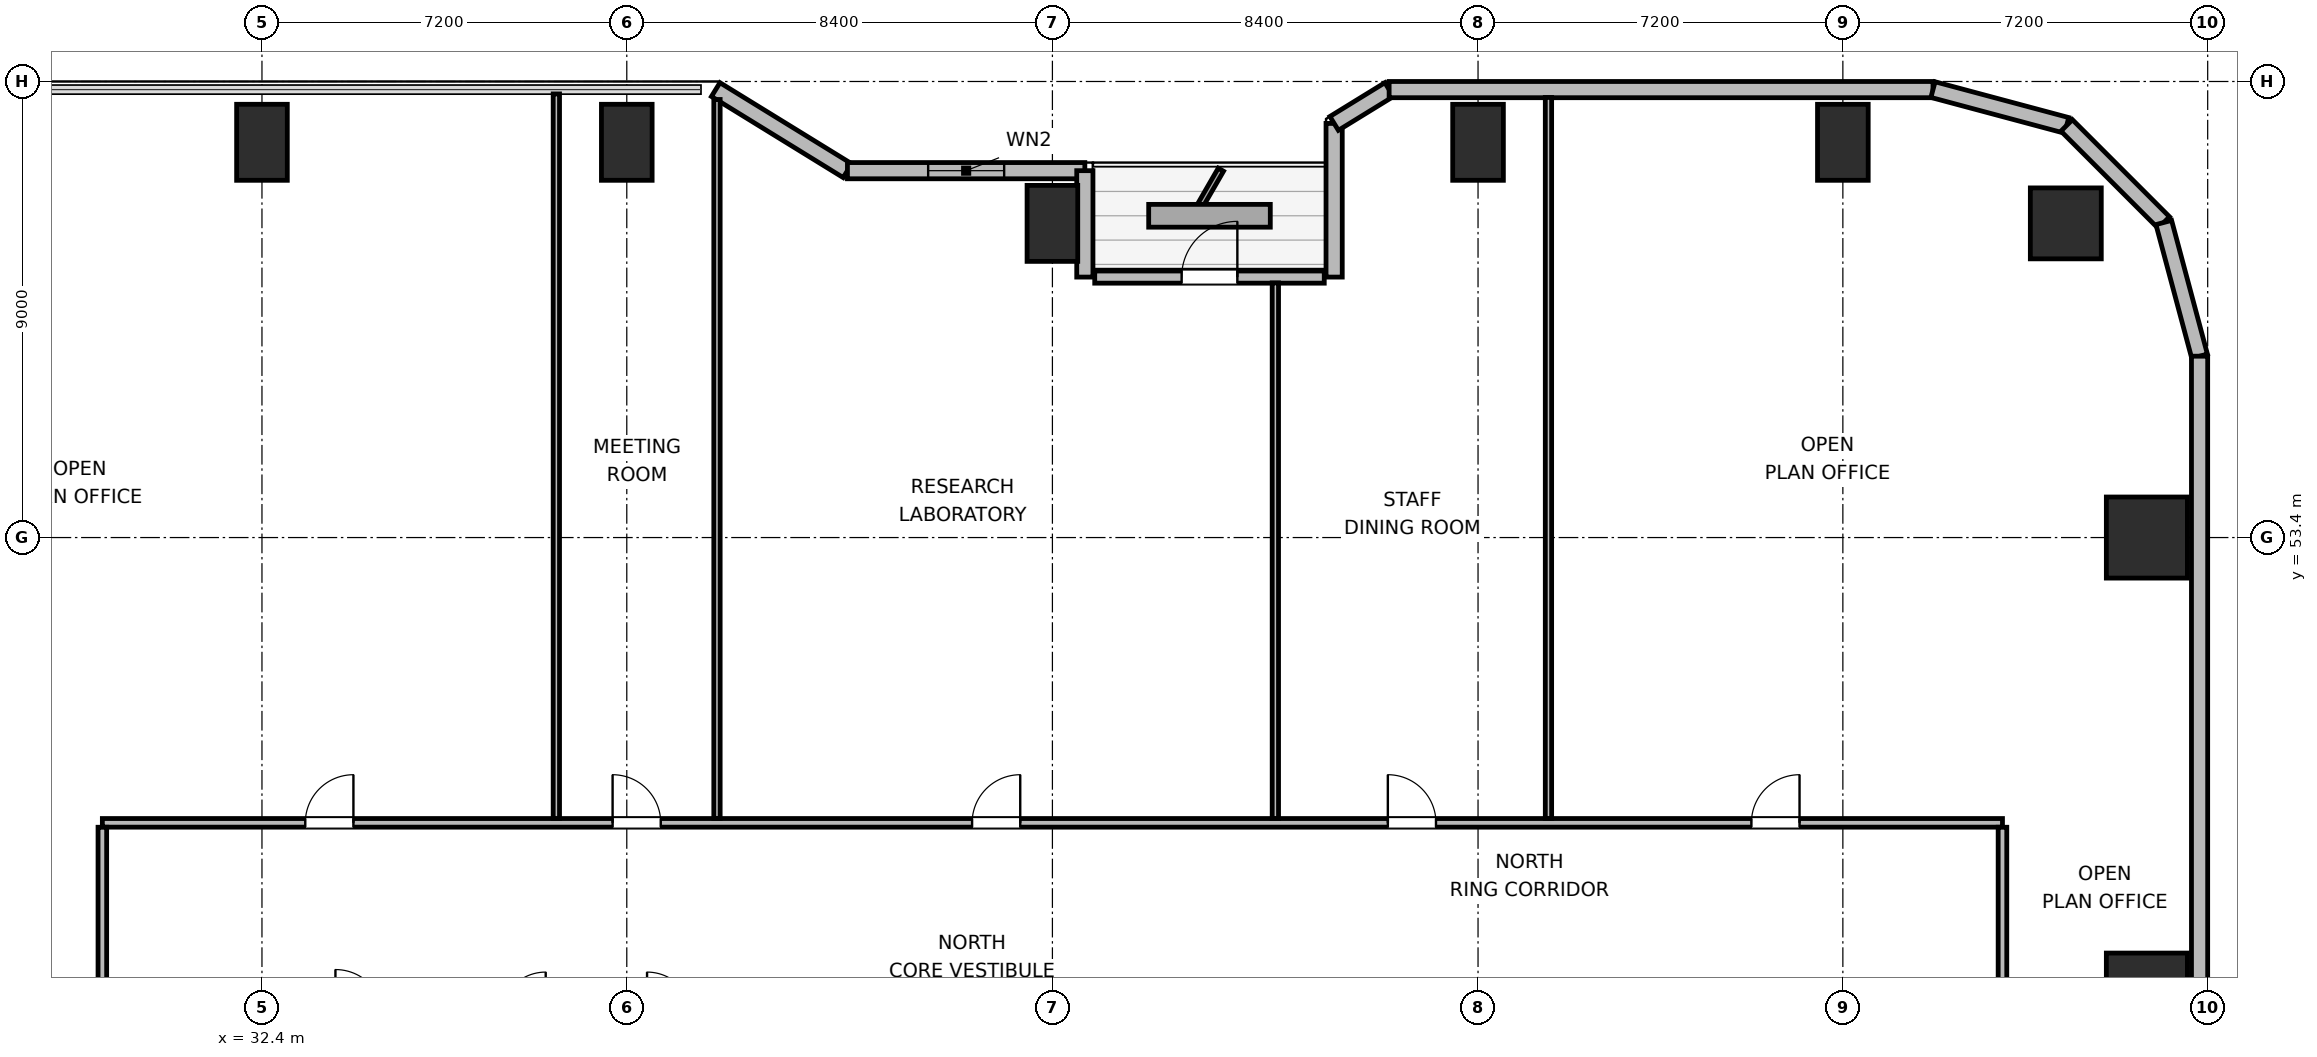
"""IFC4 building model, lengths in metres.
Left out: names, types, materials, properties, quantities, classifications, styles, units other than length and angle.
Written with IfcOpenShell. Run it as: python <this file> out.ifc"""

import sys

from ifc_helpers import new_model, si_unit, direction, frame, frame_2d, origin, origin_2d, place, context, subcontext, project, spatial, rectangle, circle, extrude, element, fill, save


model = new_model("IFC4")
c1 = context("Model", 3, precision=1e-05, world=origin(), true_north=direction((0.0, 1.0)))
c2 = subcontext(c1, "Body", "Model", "MODEL_VIEW")
j1 = project(units=[si_unit("LENGTHUNIT", "METRE"), si_unit("PLANEANGLEUNIT", "RADIAN")], contexts=[c1])
p1 = place(None, origin())
s1 = spatial("IfcSite", under=j1, at=p1, CompositionType="ELEMENT")
p2 = place(p1, origin())
s2 = spatial("IfcBuilding", under=s1, at=p2, CompositionType="ELEMENT")
p3 = place(p2, frame((0.0, 0.0, 89.7)))
s3 = spatial("IfcBuildingStorey", under=s2, at=p3, CompositionType="ELEMENT", Elevation=89.7)
p4 = place(p3, frame((68.0, 59.6, 0.0), z_axis=(0.0, 0.0, 1.0), x_axis=(1.0, 0.0, 0.0)))
e1 = element("IfcColumn", 1, at=p4, inside=s3, PredefinedType="COLUMN", context=c2, shape_type="SweptSolid", body=[
    extrude(circle(Radius=0.7, at=origin_2d()), origin(), (0.0, 0.0, 1.0), 3.9),
])
for number, where, z_axis, x_axis in (
    (2, (32.4, 61.2, 0.0), (0.0, 0.0, 1.0), (1.0, 0.0, 0.0)),
    (3, (39.6, 61.2, 0.0), (0.0, 0.0, 1.0), (1.0, 0.0, 0.0)),
    (4, (48.0, 59.6, 0.0), (0.0, 0.0, 1.0), (1.0, 0.0, 0.0)),
    (5, (56.4, 61.2, 0.0), (0.0, 0.0, 1.0), (1.0, 0.0, 0.0)),
    (6, (63.6, 61.2, 0.0), (0.0, 0.0, 1.0), (1.0, 0.0, 0.0)),
):
    element("IfcColumn", number, at=place(p3, frame(where, z_axis=z_axis, x_axis=x_axis)), inside=s3, PredefinedType="COLUMN", context=c2, shape_type="SweptSolid", body=[
        extrude(rectangle(XDim=1.0, YDim=1.5, at=origin_2d()), origin(), (0.0, 0.0, 1.0), 3.9),
    ])
for number, where, z_axis, x_axis in (
    (7, (69.6, 44.4, 0.0), (0.0, 0.0, 1.0), (1.0, 0.0, 0.0)),
    (8, (69.6, 53.4, 0.0), (0.0, 0.0, 1.0), (1.0, 0.0, 0.0)),
):
    element("IfcColumn", number, at=place(p3, frame(where, z_axis=z_axis, x_axis=x_axis)), inside=s3, PredefinedType="COLUMN", context=c2, shape_type="SweptSolid", body=[
        extrude(rectangle(XDim=1.6, YDim=1.6, at=origin_2d()), origin(), (0.0, 0.0, 1.0), 3.9),
    ])
p5 = place(p3, frame((41.355, 62.24, 0.0), z_axis=(0.0, 0.0, 1.0), x_axis=(0.851630857047, -0.524142044989, 0.0)))
e9 = element("IfcWall", 9, at=p5, inside=s3, PredefinedType="SOLIDWALL", context=c2, shape_type="SweptSolid", body=[
    extrude(rectangle(XDim=3.053, YDim=0.32, at=frame_2d((1.526, 0.0))), origin(), (0.0, 0.0, 1.0), 2.875),
])
p6 = place(p3, frame((43.955, 60.64, 0.0), z_axis=(0.0, 0.0, 1.0), x_axis=(1.0, 0.0, 0.0)))
e10 = element("IfcWall", 10, at=p6, inside=s3, PredefinedType="SOLIDWALL", context=c2, shape_type="SweptSolid", body=[
    extrude(rectangle(XDim=4.685, YDim=0.32, at=frame_2d((2.343, 0.0))), origin(), (0.0, 0.0, 1.0), 2.875),
])
p7 = place(p6, frame((1.593, 0.0, 0.85)))
e11 = element("IfcOpeningElement", 11, at=p7, cuts=e10, PredefinedType="OPENING", context=c2, shape_type="SweptSolid", body=[
    extrude(rectangle(XDim=1.5, YDim=1.1, at=frame_2d((0.75, 0.55))), frame((0.0, 0.17, 0.0), z_axis=(0.0, -1.0, 0.0), x_axis=(1.0, 0.0, 0.0)), (0.0, 0.0, 1.0), 0.34),
])
p8 = place(p3, frame((48.64, 60.64, 0.0), z_axis=(0.0, 0.0, 1.0), x_axis=(0.0, -1.0, 0.0)))
e12 = element("IfcWall", 12, at=p8, inside=s3, PredefinedType="SOLIDWALL", context=c2, shape_type="SweptSolid", body=[
    extrude(rectangle(XDim=2.1, YDim=0.32, at=frame_2d((1.05, 0.0))), origin(), (0.0, 0.0, 1.0), 2.875),
])
p9 = place(p3, frame((48.835, 58.54, 0.0), z_axis=(0.0, 0.0, 1.0), x_axis=(1.0, 0.0, 0.0)))
e13 = element("IfcWall", 13, at=p9, inside=s3, PredefinedType="SOLIDWALL", context=c2, shape_type="SweptSolid", body=[
    extrude(rectangle(XDim=4.53, YDim=0.24, at=frame_2d((2.265, 0.0))), origin(), (0.0, 0.0, 1.0), 3.64),
])
p10 = place(p9, frame((1.715, 0.0, 0.0)))
e14 = element("IfcOpeningElement", 14, at=p10, cuts=e13, PredefinedType="OPENING", context=c2, shape_type="SweptSolid", body=[
    extrude(rectangle(XDim=1.1, YDim=2.04, at=frame_2d((0.55, 1.02))), frame((0.0, 0.13, 0.0), z_axis=(0.0, -1.0, 0.0), x_axis=(1.0, 0.0, 0.0)), (0.0, 0.0, 1.0), 0.26),
])
p11 = place(p3, frame((53.56, 58.54, 0.0), z_axis=(0.0, 0.0, 1.0), x_axis=(0.0, 1.0, 0.0)))
e15 = element("IfcWall", 15, at=p11, inside=s3, PredefinedType="SOLIDWALL", context=c2, shape_type="SweptSolid", body=[
    extrude(rectangle(XDim=3.032, YDim=0.32, at=frame_2d((1.516, 0.0))), origin(), (0.0, 0.0, 1.0), 2.875),
])
p12 = place(p3, frame((53.56, 61.573, 0.0), z_axis=(0.0, 0.0, 1.0), x_axis=(0.851776724646, 0.523904964045, 0.0)))
e16 = element("IfcWall", 16, at=p12, inside=s3, PredefinedType="SOLIDWALL", context=c2, shape_type="SweptSolid", body=[
    extrude(rectangle(XDim=1.274, YDim=0.32, at=frame_2d((0.637, 0.0))), origin(), (0.0, 0.0, 1.0), 3.64),
])
p13 = place(p3, frame((54.645, 62.24, 0.0), z_axis=(0.0, 0.0, 1.0), x_axis=(1.0, 0.0, 0.0)))
e17 = element("IfcWall", 17, at=p13, inside=s3, PredefinedType="SOLIDWALL", context=c2, shape_type="SweptSolid", body=[
    extrude(rectangle(XDim=10.734, YDim=0.32, at=frame_2d((5.367, 0.0))), origin(), (0.0, 0.0, 1.0), 3.64),
])
p14 = place(p3, frame((65.379, 62.24, 0.0), z_axis=(0.0, 0.0, 1.0), x_axis=(0.965958423373, -0.25869736047, 0.0)))
e18 = element("IfcWall", 18, at=p14, inside=s3, PredefinedType="SOLIDWALL", context=c2, shape_type="SweptSolid", body=[
    extrude(rectangle(XDim=2.731, YDim=0.32, at=frame_2d((1.366, 0.0))), origin(), (0.0, 0.0, 1.0), 3.64),
])
p15 = place(p3, frame((68.017, 61.533, 0.0), z_axis=(0.0, 0.0, 1.0), x_axis=(0.707151821269, -0.707061738235, 0.0)))
e19 = element("IfcWall", 19, at=p15, inside=s3, PredefinedType="SOLIDWALL", context=c2, shape_type="SweptSolid", body=[
    extrude(rectangle(XDim=2.71, YDim=0.32, at=frame_2d((1.355, 0.0))), origin(), (0.0, 0.0, 1.0), 3.64),
])
p16 = place(p3, frame((69.934, 59.617, 0.0), z_axis=(0.0, 0.0, 1.0), x_axis=(0.258613949072, -0.965980758269, 0.0)))
e20 = element("IfcWall", 20, at=p16, inside=s3, PredefinedType="SOLIDWALL", context=c2, shape_type="SweptSolid", body=[
    extrude(rectangle(XDim=2.731, YDim=0.32, at=frame_2d((1.366, 0.0))), origin(), (0.0, 0.0, 1.0), 3.64),
])
p17 = place(p3, frame((70.64, 56.979, 0.0), z_axis=(0.0, 0.0, 1.0), x_axis=(0.0, -1.0, 0.0)))
e21 = element("IfcWall", 21, at=p17, inside=s3, PredefinedType="SOLIDWALL", context=c2, shape_type="SweptSolid", body=[
    extrude(rectangle(XDim=14.219, YDim=0.32, at=frame_2d((7.109, 0.0))), origin(), (0.0, 0.0, 1.0), 3.64),
])
p18 = place(p3, frame((29.25, 47.77, 0.0), z_axis=(0.0, 0.0, 1.0), x_axis=(1.0, 0.0, 0.0)))
e22 = element("IfcWall", 22, at=p18, inside=s3, PredefinedType="PARTITIONING", context=c2, shape_type="SweptSolid", body=[
    extrude(rectangle(XDim=37.5, YDim=0.17, at=frame_2d((18.75, 0.0))), origin(), (0.0, 0.0, 1.0), 3.64),
])
p19 = place(p18, frame((4.005, 0.0, 0.0)))
e23 = element("IfcOpeningElement", 23, at=p19, cuts=e22, PredefinedType="OPENING", context=c2, shape_type="SweptSolid", body=[
    extrude(rectangle(XDim=0.95, YDim=2.04, at=frame_2d((0.475, 1.02))), frame((0.0, 0.095, 0.0), z_axis=(0.0, -1.0, 0.0), x_axis=(1.0, 0.0, 0.0)), (0.0, 0.0, 1.0), 0.19),
])
p20 = place(p18, frame((10.07, 0.0, 0.0)))
e24 = element("IfcOpeningElement", 24, at=p20, cuts=e22, PredefinedType="OPENING", context=c2, shape_type="SweptSolid", body=[
    extrude(rectangle(XDim=0.95, YDim=2.04, at=frame_2d((0.475, 1.02))), frame((0.0, 0.095, 0.0), z_axis=(0.0, -1.0, 0.0), x_axis=(1.0, 0.0, 0.0)), (0.0, 0.0, 1.0), 0.19),
])
p21 = place(p18, frame((17.165, 0.0, 0.0)))
e25 = element("IfcOpeningElement", 25, at=p21, cuts=e22, PredefinedType="OPENING", context=c2, shape_type="SweptSolid", body=[
    extrude(rectangle(XDim=0.95, YDim=2.04, at=frame_2d((0.475, 1.02))), frame((0.0, 0.095, 0.0), z_axis=(0.0, -1.0, 0.0), x_axis=(1.0, 0.0, 0.0)), (0.0, 0.0, 1.0), 0.19),
])
p22 = place(p18, frame((25.37, 0.0, 0.0)))
e26 = element("IfcOpeningElement", 26, at=p22, cuts=e22, PredefinedType="OPENING", context=c2, shape_type="SweptSolid", body=[
    extrude(rectangle(XDim=0.95, YDim=2.04, at=frame_2d((0.475, 1.02))), frame((0.0, 0.095, 0.0), z_axis=(0.0, -1.0, 0.0), x_axis=(1.0, 0.0, 0.0)), (0.0, 0.0, 1.0), 0.19),
])
p23 = place(p18, frame((32.545, 0.0, 0.0)))
e27 = element("IfcOpeningElement", 27, at=p23, cuts=e22, PredefinedType="OPENING", context=c2, shape_type="SweptSolid", body=[
    extrude(rectangle(XDim=0.95, YDim=2.04, at=frame_2d((0.475, 1.02))), frame((0.0, 0.095, 0.0), z_axis=(0.0, -1.0, 0.0), x_axis=(1.0, 0.0, 0.0)), (0.0, 0.0, 1.0), 0.19),
])
p24 = place(p3, frame((29.25, 24.317, 0.0), z_axis=(0.0, 0.0, 1.0), x_axis=(0.0, 1.0, 0.0)))
e28 = element("IfcWall", 28, at=p24, inside=s3, PredefinedType="PARTITIONING", context=c2, shape_type="SweptSolid", body=[
    extrude(rectangle(XDim=23.366, YDim=0.17, at=frame_2d((11.683, 0.0))), origin(), (0.0, 0.0, 1.0), 3.64),
])
p25 = place(p24, frame((4.023, 0.0, 0.0)))
e29 = element("IfcOpeningElement", 29, at=p25, cuts=e28, PredefinedType="OPENING", context=c2, shape_type="SweptSolid", body=[
    extrude(rectangle(XDim=0.95, YDim=2.04, at=frame_2d((0.475, 1.02))), frame((0.0, 0.095, 0.0), z_axis=(0.0, -1.0, 0.0), x_axis=(1.0, 0.0, 0.0)), (0.0, 0.0, 1.0), 0.19),
])
p26 = place(p24, frame((11.808, 0.0, 0.0)))
e30 = element("IfcOpeningElement", 30, at=p26, cuts=e28, PredefinedType="OPENING", context=c2, shape_type="SweptSolid", body=[
    extrude(rectangle(XDim=0.95, YDim=2.04, at=frame_2d((0.475, 1.02))), frame((0.0, 0.095, 0.0), z_axis=(0.0, -1.0, 0.0), x_axis=(1.0, 0.0, 0.0)), (0.0, 0.0, 1.0), 0.19),
])
p27 = place(p24, frame((18.993, 0.0, 0.0)))
e31 = element("IfcOpeningElement", 31, at=p27, cuts=e28, PredefinedType="OPENING", context=c2, shape_type="SweptSolid", body=[
    extrude(rectangle(XDim=0.95, YDim=2.04, at=frame_2d((0.475, 1.02))), frame((0.0, 0.095, 0.0), z_axis=(0.0, -1.0, 0.0), x_axis=(1.0, 0.0, 0.0)), (0.0, 0.0, 1.0), 0.19),
])
p28 = place(p3, frame((66.75, 24.317, 0.0), z_axis=(0.0, 0.0, 1.0), x_axis=(0.0, 1.0, 0.0)))
e32 = element("IfcWall", 32, at=p28, inside=s3, PredefinedType="PARTITIONING", context=c2, shape_type="SweptSolid", body=[
    extrude(rectangle(XDim=23.366, YDim=0.17, at=frame_2d((11.683, 0.0))), origin(), (0.0, 0.0, 1.0), 3.64),
])
p29 = place(p28, frame((4.823, 0.0, 0.0)))
e33 = element("IfcOpeningElement", 33, at=p29, cuts=e32, PredefinedType="OPENING", context=c2, shape_type="SweptSolid", body=[
    extrude(rectangle(XDim=0.95, YDim=2.04, at=frame_2d((0.475, 1.02))), frame((0.0, 0.095, 0.0), z_axis=(0.0, -1.0, 0.0), x_axis=(1.0, 0.0, 0.0)), (0.0, 0.0, 1.0), 0.19),
])
p30 = place(p28, frame((16.593, 0.0, 0.0)))
e34 = element("IfcOpeningElement", 34, at=p30, cuts=e32, PredefinedType="OPENING", context=c2, shape_type="SweptSolid", body=[
    extrude(rectangle(XDim=0.95, YDim=2.04, at=frame_2d((0.475, 1.02))), frame((0.0, 0.095, 0.0), z_axis=(0.0, -1.0, 0.0), x_axis=(1.0, 0.0, 0.0)), (0.0, 0.0, 1.0), 0.19),
])
p31 = place(p3, frame((38.21, 47.857, 0.0), z_axis=(0.0, 0.0, 1.0), x_axis=(0.0, 1.0, 0.0)))
e35 = element("IfcWall", 35, at=p31, inside=s3, PredefinedType="PARTITIONING", context=c2, shape_type="SweptSolid", body=[
    extrude(rectangle(XDim=14.298, YDim=0.125, at=frame_2d((7.149, 0.0))), origin(), (0.0, 0.0, 1.0), 3.64),
])
p32 = place(p3, frame((41.38, 47.857, 0.0), z_axis=(0.0, 0.0, 1.0), x_axis=(0.0, 1.0, 0.0)))
e36 = element("IfcWall", 36, at=p32, inside=s3, PredefinedType="PARTITIONING", context=c2, shape_type="SweptSolid", body=[
    extrude(rectangle(XDim=14.188, YDim=0.125, at=frame_2d((7.094, 0.0))), origin(), (0.0, 0.0, 1.0), 3.003),
])
p33 = place(p3, frame((52.4, 47.857, 0.0), z_axis=(0.0, 0.0, 1.0), x_axis=(0.0, 1.0, 0.0)))
e37 = element("IfcWall", 37, at=p33, inside=s3, PredefinedType="PARTITIONING", context=c2, shape_type="SweptSolid", body=[
    extrude(rectangle(XDim=10.568, YDim=0.125, at=frame_2d((5.284, 0.0))), origin(), (0.0, 0.0, 1.0), 3.003),
])
p34 = place(p3, frame((57.79, 47.857, 0.0), z_axis=(0.0, 0.0, 1.0), x_axis=(0.0, 1.0, 0.0)))
e38 = element("IfcWall", 38, at=p34, inside=s3, PredefinedType="PARTITIONING", context=c2, shape_type="SweptSolid", body=[
    extrude(rectangle(XDim=14.228, YDim=0.125, at=frame_2d((7.114, 0.0))), origin(), (0.0, 0.0, 1.0), 3.64),
])
p35 = place(p7, origin())
e39 = element("IfcWindow", 39, at=p35, inside=s3, PartitioningType="SINGLE_PANEL", PredefinedType="WINDOW", context=c2, shape_type="SweptSolid", body=[
    extrude(rectangle(XDim=1.5, YDim=1.1, at=frame_2d((0.75, 0.55))), frame((0.0, 0.03, 0.0), z_axis=(0.0, -1.0, 0.0), x_axis=(1.0, 0.0, 0.0)), (0.0, 0.0, 1.0), 0.06),
])
fill(e11, e39)
p36 = place(p10, origin())
e40 = element("IfcDoor", 40, at=p36, inside=s3, OperationType="SINGLE_SWING_RIGHT", PredefinedType="DOOR", context=c2, shape_type="SweptSolid", body=[
    extrude(rectangle(XDim=1.1, YDim=2.04, at=frame_2d((0.55, 1.02))), frame((0.0, 0.025, 0.0), z_axis=(0.0, -1.0, 0.0), x_axis=(1.0, 0.0, 0.0)), (0.0, 0.0, 1.0), 0.05),
])
fill(e14, e40)
p37 = place(p19, origin())
e41 = element("IfcDoor", 41, at=p37, inside=s3, OperationType="SINGLE_SWING_RIGHT", PredefinedType="DOOR", context=c2, shape_type="SweptSolid", body=[
    extrude(rectangle(XDim=0.95, YDim=2.04, at=frame_2d((0.475, 1.02))), frame((0.0, 0.025, 0.0), z_axis=(0.0, -1.0, 0.0), x_axis=(1.0, 0.0, 0.0)), (0.0, 0.0, 1.0), 0.05),
])
fill(e23, e41)
p38 = place(p20, origin())
e42 = element("IfcDoor", 42, at=p38, inside=s3, OperationType="SINGLE_SWING_LEFT", PredefinedType="DOOR", context=c2, shape_type="SweptSolid", body=[
    extrude(rectangle(XDim=0.95, YDim=2.04, at=frame_2d((0.475, 1.02))), frame((0.0, 0.025, 0.0), z_axis=(0.0, -1.0, 0.0), x_axis=(1.0, 0.0, 0.0)), (0.0, 0.0, 1.0), 0.05),
])
fill(e24, e42)
p39 = place(p21, origin())
e43 = element("IfcDoor", 43, at=p39, inside=s3, OperationType="SINGLE_SWING_RIGHT", PredefinedType="DOOR", context=c2, shape_type="SweptSolid", body=[
    extrude(rectangle(XDim=0.95, YDim=2.04, at=frame_2d((0.475, 1.02))), frame((0.0, 0.025, 0.0), z_axis=(0.0, -1.0, 0.0), x_axis=(1.0, 0.0, 0.0)), (0.0, 0.0, 1.0), 0.05),
])
fill(e25, e43)
p40 = place(p22, origin())
e44 = element("IfcDoor", 44, at=p40, inside=s3, OperationType="SINGLE_SWING_LEFT", PredefinedType="DOOR", context=c2, shape_type="SweptSolid", body=[
    extrude(rectangle(XDim=0.95, YDim=2.04, at=frame_2d((0.475, 1.02))), frame((0.0, 0.025, 0.0), z_axis=(0.0, -1.0, 0.0), x_axis=(1.0, 0.0, 0.0)), (0.0, 0.0, 1.0), 0.05),
])
fill(e26, e44)
p41 = place(p23, origin())
e45 = element("IfcDoor", 45, at=p41, inside=s3, OperationType="SINGLE_SWING_RIGHT", PredefinedType="DOOR", context=c2, shape_type="SweptSolid", body=[
    extrude(rectangle(XDim=0.95, YDim=2.04, at=frame_2d((0.475, 1.02))), frame((0.0, 0.025, 0.0), z_axis=(0.0, -1.0, 0.0), x_axis=(1.0, 0.0, 0.0)), (0.0, 0.0, 1.0), 0.05),
])
fill(e27, e45)
save(model, sys.argv[1])
